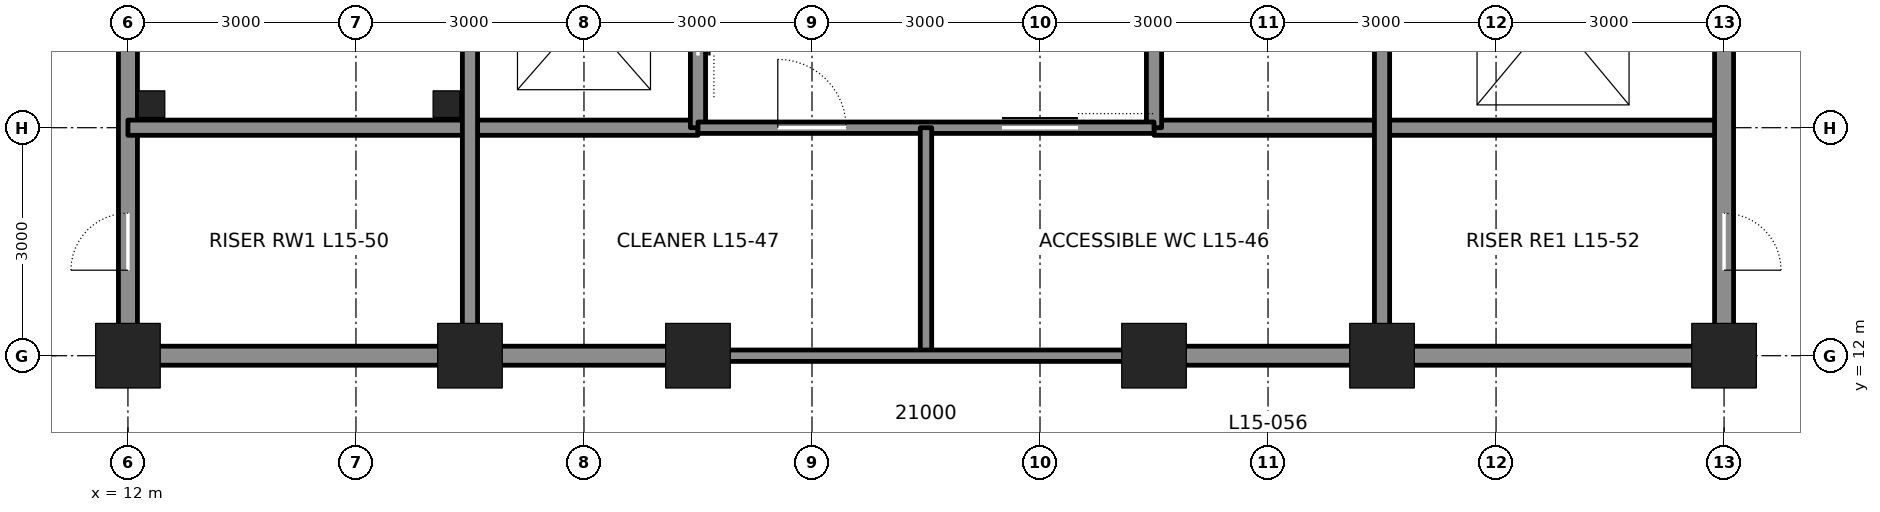
"""IFC4 building model, lengths in metres.
Left out: names, types, materials, properties, quantities, classifications, styles, units other than length and angle.
Written with IfcOpenShell. Run it as: python <this file> out.ifc"""

import sys

from ifc_helpers import new_model, si_unit, direction, frame, frame_2d, origin, origin_2d, place, context, subcontext, project, spatial, rectangle, hollow_rectangle, extrude, element, fill, save


model = new_model("IFC4")
c1 = context("Model", 3, precision=1e-05, world=origin(), true_north=direction((0.0, 1.0)))
c2 = subcontext(c1, "Body", "Model", "MODEL_VIEW")
j1 = project(units=[si_unit("LENGTHUNIT", "METRE"), si_unit("PLANEANGLEUNIT", "RADIAN")], contexts=[c1])
p1 = place(None, origin())
s1 = spatial("IfcSite", under=j1, at=p1, CompositionType="ELEMENT")
p2 = place(p1, origin())
s2 = spatial("IfcBuilding", under=s1, at=p2, CompositionType="ELEMENT")
p3 = place(p2, frame((0.0, 0.0, 73.8)))
s3 = spatial("IfcBuildingStorey", under=s2, at=p3, CompositionType="ELEMENT", Elevation=73.8)
for number, where, z_axis, x_axis in (
    (1, (12.0, 12.0, 0.0), (0.0, 0.0, 1.0), (1.0, 0.0, 0.0)),
    (2, (16.5, 12.0, 0.0), (0.0, 0.0, 1.0), (1.0, 0.0, 0.0)),
    (3, (19.5, 12.0, 0.0), (0.0, 0.0, 1.0), (1.0, 0.0, 0.0)),
    (4, (25.5, 12.0, 0.0), (0.0, 0.0, 1.0), (1.0, 0.0, 0.0)),
    (5, (28.5, 12.0, 0.0), (0.0, 0.0, 1.0), (1.0, 0.0, 0.0)),
    (6, (33.0, 12.0, 0.0), (0.0, 0.0, 1.0), (1.0, 0.0, 0.0)),
):
    element("IfcColumn", number, at=place(p3, frame(where, z_axis=z_axis, x_axis=x_axis)), inside=s3, PredefinedType="COLUMN", context=c2, shape_type="SweptSolid", body=[
        extrude(hollow_rectangle(XDim=0.85, YDim=0.85, WallThickness=0.085, at=origin_2d()), origin(), (0.0, 0.0, 1.0), 4.5),
    ])
p4 = place(p3, frame((12.0, 12.25, 0.0), z_axis=(0.0, 0.0, 1.0), x_axis=(0.0, 1.0, 0.0)))
e7 = element("IfcWall", 7, at=p4, inside=s3, PredefinedType="SOLIDWALL", context=c2, shape_type="SweptSolid", body=[
    extrude(rectangle(XDim=8.5, YDim=0.25, at=frame_2d((4.25, 0.0))), origin(), (0.0, 0.0, 1.0), 3.113),
])
p5 = place(p4, frame((0.875, 0.0, 0.0)))
e8 = element("IfcOpeningElement", 8, at=p5, cuts=e7, PredefinedType="OPENING", context=c2, shape_type="SweptSolid", body=[
    extrude(rectangle(XDim=0.75, YDim=2.1, at=frame_2d((0.375, 1.05))), frame((0.0, 0.135, 0.0), z_axis=(0.0, -1.0, 0.0), x_axis=(1.0, 0.0, 0.0)), (0.0, 0.0, 1.0), 0.27),
])
p6 = place(p3, frame((12.25, 12.0, 0.0), z_axis=(0.0, 0.0, 1.0), x_axis=(1.0, 0.0, 0.0)))
e9 = element("IfcWall", 9, at=p6, inside=s3, PredefinedType="SOLIDWALL", context=c2, shape_type="SweptSolid", body=[
    extrude(rectangle(XDim=4.0, YDim=0.25, at=frame_2d((2.0, 0.0))), origin(), (0.0, 0.0, 1.0), 3.181),
])
for number, where, z_axis, x_axis in (
    (10, (16.75, 12.0, 0.0), (0.0, 0.0, 1.0), (1.0, 0.0, 0.0)),
    (11, (25.75, 12.0, 0.0), (0.0, 0.0, 1.0), (1.0, 0.0, 0.0)),
):
    element("IfcWall", number, at=place(p3, frame(where, z_axis=z_axis, x_axis=x_axis)), inside=s3, PredefinedType="SOLIDWALL", context=c2, shape_type="SweptSolid", body=[
        extrude(rectangle(XDim=2.5, YDim=0.25, at=frame_2d((1.25, 0.0))), origin(), (0.0, 0.0, 1.0), 3.181),
    ])
p7 = place(p3, frame((28.75, 12.0, 0.0), z_axis=(0.0, 0.0, 1.0), x_axis=(1.0, 0.0, 0.0)))
e12 = element("IfcWall", 12, at=p7, inside=s3, PredefinedType="SOLIDWALL", context=c2, shape_type="SweptSolid", body=[
    extrude(rectangle(XDim=4.0, YDim=0.25, at=frame_2d((2.0, 0.0))), origin(), (0.0, 0.0, 1.0), 3.181),
])
for number, where, z_axis, x_axis in (
    (13, (12.0, 15.0, 0.0), (0.0, 0.0, 1.0), (1.0, 0.0, 0.0)),
    (14, (25.5, 15.0, 0.0), (0.0, 0.0, 1.0), (1.0, 0.0, 0.0)),
):
    element("IfcWall", number, at=place(p3, frame(where, z_axis=z_axis, x_axis=x_axis)), inside=s3, PredefinedType="SOLIDWALL", context=c2, shape_type="SweptSolid", body=[
        extrude(rectangle(XDim=7.5, YDim=0.2, at=frame_2d((3.75, 0.0))), origin(), (0.0, 0.0, 1.0), 4.34),
    ])
p8 = place(p3, frame((16.5, 12.25, 0.0), z_axis=(0.0, 0.0, 1.0), x_axis=(0.0, 1.0, 0.0)))
e15 = element("IfcWall", 15, at=p8, inside=s3, PredefinedType="SOLIDWALL", context=c2, shape_type="SweptSolid", body=[
    extrude(rectangle(XDim=8.5, YDim=0.2, at=frame_2d((4.25, 0.0))), origin(), (0.0, 0.0, 1.0), 3.413),
])
p9 = place(p3, frame((19.5, 15.0, 0.0), z_axis=(0.0, 0.0, 1.0), x_axis=(0.0, 1.0, 0.0)))
e16 = element("IfcWall", 16, at=p9, inside=s3, PredefinedType="SOLIDWALL", context=c2, shape_type="SweptSolid", body=[
    extrude(rectangle(XDim=12.0, YDim=0.2, at=frame_2d((6.0, 0.0))), origin(), (0.0, 0.0, 1.0), 3.365),
])
p10 = place(p9, frame((0.95, 0.0, 0.0)))
e17 = element("IfcOpeningElement", 17, at=p10, cuts=e16, PredefinedType="OPENING", context=c2, shape_type="SweptSolid", body=[
    extrude(rectangle(XDim=1.1, YDim=2.1, at=frame_2d((0.55, 1.05))), frame((0.0, 0.11, 0.0), z_axis=(0.0, -1.0, 0.0), x_axis=(1.0, 0.0, 0.0)), (0.0, 0.0, 1.0), 0.22),
])
p11 = place(p9, frame((3.95, 0.0, 0.0)))
e18 = element("IfcOpeningElement", 18, at=p11, cuts=e16, PredefinedType="OPENING", context=c2, shape_type="SweptSolid", body=[
    extrude(rectangle(XDim=1.1, YDim=2.1, at=frame_2d((0.55, 1.05))), frame((0.0, 0.11, 0.0), z_axis=(0.0, -1.0, 0.0), x_axis=(1.0, 0.0, 0.0)), (0.0, 0.0, 1.0), 0.22),
])
p12 = place(p9, frame((6.95, 0.0, 0.0)))
e19 = element("IfcOpeningElement", 19, at=p12, cuts=e16, PredefinedType="OPENING", context=c2, shape_type="SweptSolid", body=[
    extrude(rectangle(XDim=1.1, YDim=2.1, at=frame_2d((0.55, 1.05))), frame((0.0, 0.11, 0.0), z_axis=(0.0, -1.0, 0.0), x_axis=(1.0, 0.0, 0.0)), (0.0, 0.0, 1.0), 0.22),
])
p13 = place(p9, frame((9.95, 0.0, 0.0)))
e20 = element("IfcOpeningElement", 20, at=p13, cuts=e16, PredefinedType="OPENING", context=c2, shape_type="SweptSolid", body=[
    extrude(rectangle(XDim=1.1, YDim=2.1, at=frame_2d((0.55, 1.05))), frame((0.0, 0.11, 0.0), z_axis=(0.0, -1.0, 0.0), x_axis=(1.0, 0.0, 0.0)), (0.0, 0.0, 1.0), 0.22),
])
p14 = place(p3, frame((25.5, 15.0, 0.0), z_axis=(0.0, 0.0, 1.0), x_axis=(0.0, 1.0, 0.0)))
e21 = element("IfcWall", 21, at=p14, inside=s3, PredefinedType="SOLIDWALL", context=c2, shape_type="SweptSolid", body=[
    extrude(rectangle(XDim=12.0, YDim=0.2, at=frame_2d((6.0, 0.0))), origin(), (0.0, 0.0, 1.0), 3.365),
])
p15 = place(p3, frame((28.5, 12.25, 0.0), z_axis=(0.0, 0.0, 1.0), x_axis=(0.0, 1.0, 0.0)))
e22 = element("IfcWall", 22, at=p15, inside=s3, PredefinedType="SOLIDWALL", context=c2, shape_type="SweptSolid", body=[
    extrude(rectangle(XDim=8.5, YDim=0.2, at=frame_2d((4.25, 0.0))), origin(), (0.0, 0.0, 1.0), 3.413),
])
p16 = place(p3, frame((33.0, 12.25, 0.0), z_axis=(0.0, 0.0, 1.0), x_axis=(0.0, 1.0, 0.0)))
e23 = element("IfcWall", 23, at=p16, inside=s3, PredefinedType="SOLIDWALL", context=c2, shape_type="SweptSolid", body=[
    extrude(rectangle(XDim=8.5, YDim=0.25, at=frame_2d((4.25, 0.0))), origin(), (0.0, 0.0, 1.0), 3.113),
])
p17 = place(p16, frame((6.65, 0.0, 0.0)))
e24 = element("IfcOpeningElement", 24, at=p17, cuts=e23, PredefinedType="OPENING", context=c2, shape_type="SweptSolid", body=[
    extrude(rectangle(XDim=1.2, YDim=2.1, at=frame_2d((0.6, 1.05))), frame((0.0, 0.135, 0.0), z_axis=(0.0, -1.0, 0.0), x_axis=(1.0, 0.0, 0.0)), (0.0, 0.0, 1.0), 0.27),
])
p18 = place(p16, frame((0.875, 0.0, 0.0)))
e25 = element("IfcOpeningElement", 25, at=p18, cuts=e23, PredefinedType="OPENING", context=c2, shape_type="SweptSolid", body=[
    extrude(rectangle(XDim=0.75, YDim=2.1, at=frame_2d((0.375, 1.05))), frame((0.0, 0.135, 0.0), z_axis=(0.0, -1.0, 0.0), x_axis=(1.0, 0.0, 0.0)), (0.0, 0.0, 1.0), 0.27),
])
p19 = place(p3, frame((19.5, 15.0, 0.0), z_axis=(0.0, 0.0, 1.0), x_axis=(1.0, 0.0, 0.0)))
e26 = element("IfcWall", 26, at=p19, inside=s3, PredefinedType="PARTITIONING", context=c2, shape_type="SweptSolid", body=[
    extrude(rectangle(XDim=6.0, YDim=0.15, at=frame_2d((3.0, 0.0))), origin(), (0.0, 0.0, 1.0), 4.34),
])
p20 = place(p19, frame((4.0, 0.0, 0.0)))
e27 = element("IfcOpeningElement", 27, at=p20, cuts=e26, PredefinedType="OPENING", context=c2, shape_type="SweptSolid", body=[
    extrude(rectangle(XDim=1.0, YDim=2.1, at=frame_2d((0.5, 1.05))), frame((0.0, 0.085, 0.0), z_axis=(0.0, -1.0, 0.0), x_axis=(1.0, 0.0, 0.0)), (0.0, 0.0, 1.0), 0.17),
])
p21 = place(p19, frame((1.05, 0.0, 0.0)))
e28 = element("IfcOpeningElement", 28, at=p21, cuts=e26, PredefinedType="OPENING", context=c2, shape_type="SweptSolid", body=[
    extrude(rectangle(XDim=0.9, YDim=2.1, at=frame_2d((0.45, 1.05))), frame((0.0, 0.085, 0.0), z_axis=(0.0, -1.0, 0.0), x_axis=(1.0, 0.0, 0.0)), (0.0, 0.0, 1.0), 0.17),
])
p22 = place(p3, frame((22.5, 15.0, 0.0), z_axis=(0.0, 0.0, 1.0), x_axis=(0.0, -1.0, 0.0)))
e29 = element("IfcWall", 29, at=p22, inside=s3, PredefinedType="PARTITIONING", context=c2, shape_type="SweptSolid", body=[
    extrude(rectangle(XDim=3.0, YDim=0.15, at=frame_2d((1.5, 0.0))), origin(), (0.0, 0.0, 1.0), 4.34),
])
p23 = place(p3, frame((19.5, 12.0, 0.0), z_axis=(0.0, 0.0, 1.0), x_axis=(1.0, 0.0, 0.0)))
e30 = element("IfcWall", 30, at=p23, inside=s3, PredefinedType="PARTITIONING", context=c2, shape_type="SweptSolid", body=[
    extrude(rectangle(XDim=6.0, YDim=0.15, at=frame_2d((3.0, 0.0))), origin(), (0.0, 0.0, 1.0), 3.181),
])
for number, where, z_axis, x_axis in (
    (31, (12.31, 15.31, 0.0), (0.0, 0.0, 1.0), (1.0, 0.0, 0.0)),
    (32, (16.19, 15.31, 0.0), (0.0, 0.0, 1.0), (1.0, 0.0, 0.0)),
):
    element("IfcColumn", number, at=place(p3, frame(where, z_axis=z_axis, x_axis=x_axis)), inside=s3, PredefinedType="COLUMN", context=c2, shape_type="SweptSolid", body=[
        extrude(hollow_rectangle(XDim=0.35, YDim=0.35, WallThickness=0.035, at=origin_2d()), origin(), (0.0, 0.0, 1.0), 4.5),
    ])
p24 = place(p5, origin())
e33 = element("IfcDoor", 33, at=p24, inside=s3, OperationType="SINGLE_SWING_LEFT", PredefinedType="DOOR", context=c2, shape_type="SweptSolid", body=[
    extrude(rectangle(XDim=0.75, YDim=2.1, at=frame_2d((0.375, 1.05))), frame((0.0, 0.025, 0.0), z_axis=(0.0, -1.0, 0.0), x_axis=(1.0, 0.0, 0.0)), (0.0, 0.0, 1.0), 0.05),
])
fill(e8, e33)
p25 = place(p18, frame((0.75, 0.0, 0.0), z_axis=(0.0, 0.0, 1.0), x_axis=(-1.0, 0.0, 0.0)))
e34 = element("IfcDoor", 34, at=p25, inside=s3, OperationType="SINGLE_SWING_RIGHT", PredefinedType="DOOR", context=c2, shape_type="SweptSolid", body=[
    extrude(rectangle(XDim=0.75, YDim=2.1, at=frame_2d((0.375, 1.05))), frame((0.0, 0.025, 0.0), z_axis=(0.0, -1.0, 0.0), x_axis=(1.0, 0.0, 0.0)), (0.0, 0.0, 1.0), 0.05),
])
fill(e25, e34)
p26 = place(p20, origin())
e35 = element("IfcDoor", 35, at=p26, inside=s3, OperationType="SLIDING_TO_LEFT", PredefinedType="DOOR", context=c2, shape_type="SweptSolid", body=[
    extrude(rectangle(XDim=1.0, YDim=2.1, at=frame_2d((0.5, 1.05))), frame((0.0, 0.025, 0.0), z_axis=(0.0, -1.0, 0.0), x_axis=(1.0, 0.0, 0.0)), (0.0, 0.0, 1.0), 0.05),
])
fill(e27, e35)
p27 = place(p21, origin())
e36 = element("IfcDoor", 36, at=p27, inside=s3, OperationType="SINGLE_SWING_LEFT", PredefinedType="DOOR", context=c2, shape_type="SweptSolid", body=[
    extrude(rectangle(XDim=0.9, YDim=2.1, at=frame_2d((0.45, 1.05))), frame((0.0, 0.025, 0.0), z_axis=(0.0, -1.0, 0.0), x_axis=(1.0, 0.0, 0.0)), (0.0, 0.0, 1.0), 0.05),
])
fill(e28, e36)
p28 = place(p10, origin())
e37 = element("IfcDoor", 37, at=p28, inside=s3, OperationType="DOUBLE_DOOR_SLIDING", PredefinedType="DOOR", context=c2, shape_type="SweptSolid", body=[
    extrude(rectangle(XDim=1.1, YDim=2.1, at=frame_2d((0.55, 1.05))), frame((0.0, 0.025, 0.0), z_axis=(0.0, -1.0, 0.0), x_axis=(1.0, 0.0, 0.0)), (0.0, 0.0, 1.0), 0.05),
])
fill(e17, e37)
save(model, sys.argv[1])
